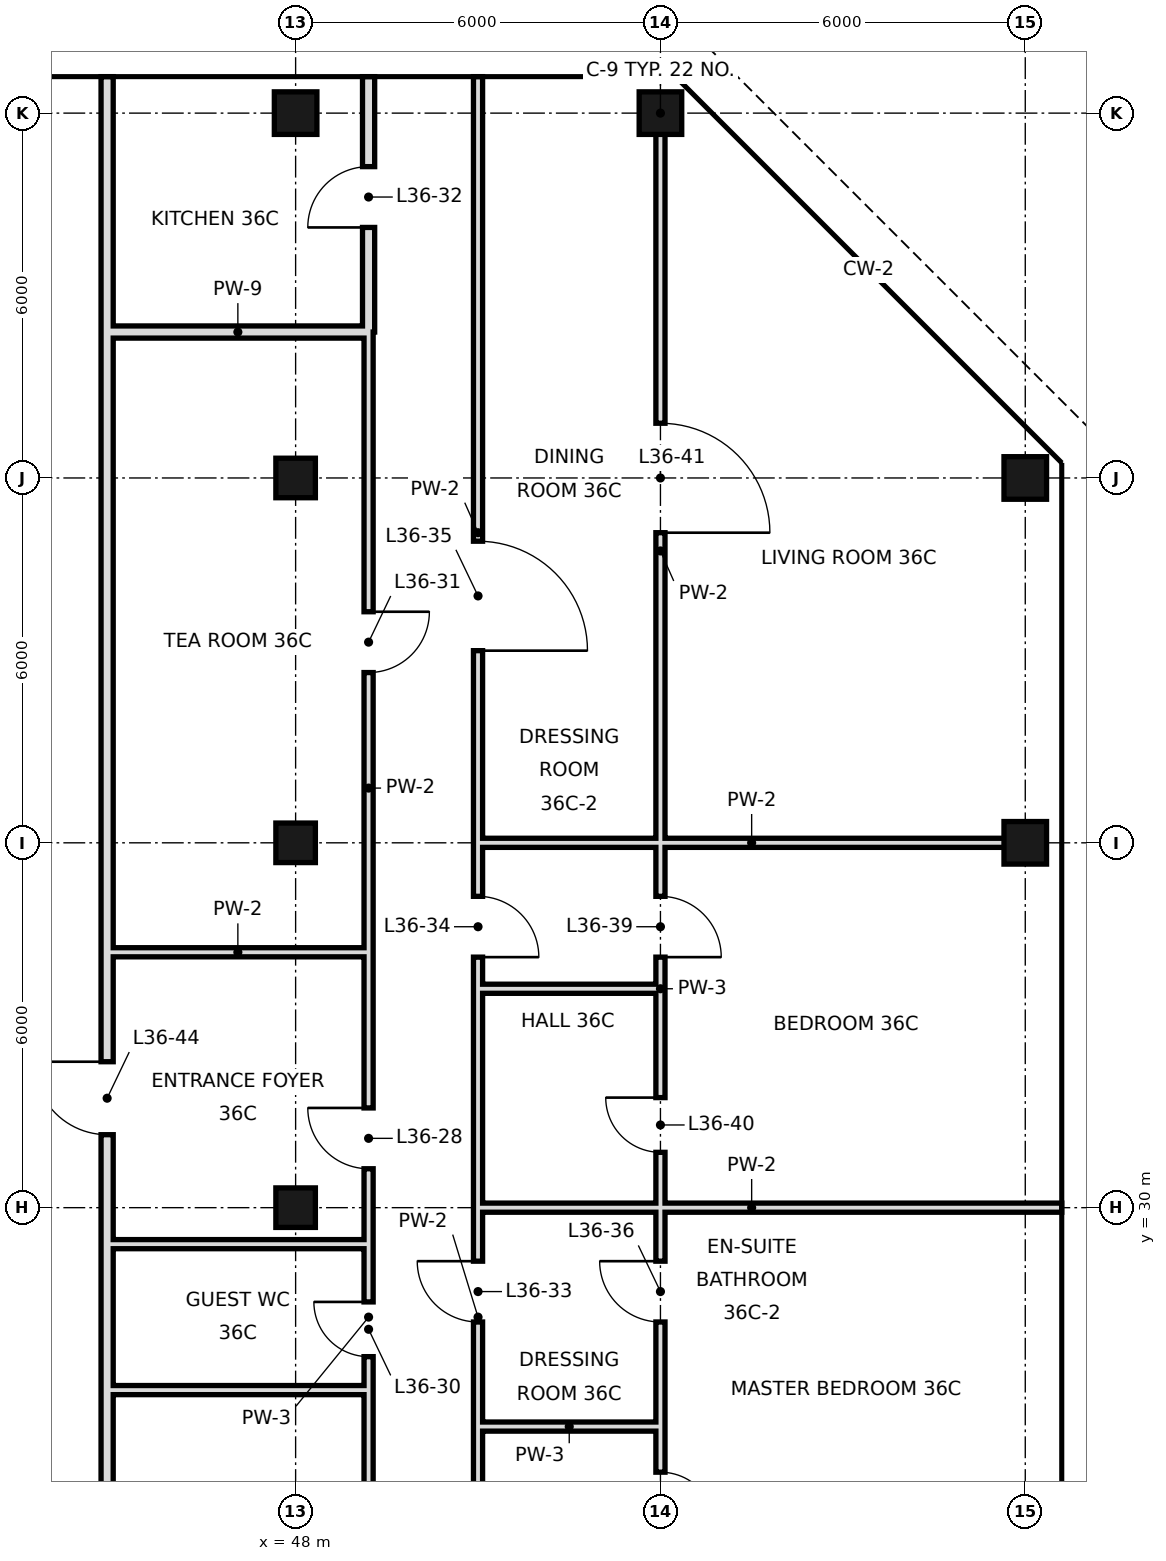
"""IFC4 building model, lengths in metres.
Left out: names, types, materials, properties, quantities, classifications, styles, units other than length and angle.
Written with IfcOpenShell. Run it as: python <this file> out.ifc"""

import sys

from ifc_helpers import new_model, si_unit, direction, frame, frame_2d, origin, origin_2d, place, context, subcontext, project, spatial, rectangle, hollow_rectangle, extrude, element, fill, save


model = new_model("IFC4")
c1 = context("Model", 3, precision=1e-05, world=origin(), true_north=direction((0.0, 1.0)))
c2 = subcontext(c1, "Body", "Model", "MODEL_VIEW")
j1 = project(units=[si_unit("LENGTHUNIT", "METRE"), si_unit("PLANEANGLEUNIT", "RADIAN")], contexts=[c1])
p1 = place(None, origin())
s1 = spatial("IfcSite", under=j1, at=p1, CompositionType="ELEMENT")
p2 = place(p1, origin())
s2 = spatial("IfcBuilding", under=s1, at=p2, CompositionType="ELEMENT")
p3 = place(p2, frame((0.0, 0.0, 158.2)))
s3 = spatial("IfcBuildingStorey", under=s2, at=p3, CompositionType="ELEMENT", Elevation=158.2)
for number, where, z_axis, x_axis in (
    (1, (48.0, 30.0, 0.0), (0.0, 0.0, 1.0), (1.0, 0.0, 0.0)),
    (2, (48.0, 36.0, 0.0), (0.0, 0.0, 1.0), (1.0, 0.0, 0.0)),
    (3, (48.0, 42.0, 0.0), (0.0, 0.0, 1.0), (1.0, 0.0, 0.0)),
):
    element("IfcColumn", number, at=place(p3, frame(where, z_axis=z_axis, x_axis=x_axis)), inside=s3, PredefinedType="COLUMN", context=c2, shape_type="SweptSolid", body=[
        extrude(hollow_rectangle(XDim=0.65, YDim=0.65, WallThickness=0.032, at=origin_2d()), origin(), (0.0, 0.0, 1.0), 3.6),
    ])
for number, where, z_axis, x_axis in (
    (4, (48.0, 48.0, 0.0), (0.0, 0.0, 1.0), (1.0, 0.0, 0.0)),
    (5, (54.0, 48.0, 0.0), (0.0, 0.0, 1.0), (1.0, 0.0, 0.0)),
    (6, (60.0, 36.0, 0.0), (0.0, 0.0, 1.0), (1.0, 0.0, 0.0)),
    (7, (60.0, 42.0, 0.0), (0.0, 0.0, 1.0), (1.0, 0.0, 0.0)),
):
    element("IfcColumn", number, at=place(p3, frame(where, z_axis=z_axis, x_axis=x_axis)), inside=s3, PredefinedType="COLUMN", context=c2, shape_type="SweptSolid", body=[
        extrude(hollow_rectangle(XDim=0.7, YDim=0.7, WallThickness=0.036, at=origin_2d()), origin(), (0.0, 0.0, 1.0), 3.6),
    ])
p4 = place(p3, frame((44.9, 18.7, 0.0), z_axis=(0.0, 0.0, 1.0), x_axis=(0.0, 1.0, 0.0)))
e8 = element("IfcWall", 8, at=p4, inside=s3, PredefinedType="SOLIDWALL", context=c2, shape_type="SweptSolid", body=[
    extrude(rectangle(XDim=25.7, YDim=0.2, at=frame_2d((12.85, 0.0))), origin(), (0.0, 0.0, 1.0), 2.93),
])
p5 = place(p4, frame((12.5, 0.0, 0.0)))
e9 = element("IfcOpeningElement", 9, at=p5, cuts=e8, PredefinedType="OPENING", context=c2, shape_type="SweptSolid", body=[
    extrude(rectangle(XDim=1.2, YDim=2.4, at=frame_2d((0.6, 1.2))), frame((0.0, 0.11, 0.0), z_axis=(0.0, -1.0, 0.0), x_axis=(1.0, 0.0, 0.0)), (0.0, 0.0, 1.0), 0.22),
])
p6 = place(p3, frame((44.9, 44.4, 0.0), z_axis=(0.0, 0.0, 1.0), x_axis=(0.0, 1.0, 0.0)))
e10 = element("IfcWall", 10, at=p6, inside=s3, PredefinedType="SOLIDWALL", context=c2, shape_type="SweptSolid", body=[
    extrude(rectangle(XDim=4.2, YDim=0.2, at=frame_2d((2.1, 0.0))), origin(), (0.0, 0.0, 1.0), 2.68),
])
p7 = place(p3, frame((49.2, 44.4, 0.0), z_axis=(0.0, 0.0, 1.0), x_axis=(0.0, 1.0, 0.0)))
e11 = element("IfcWall", 11, at=p7, inside=s3, PredefinedType="SOLIDWALL", context=c2, shape_type="SweptSolid", body=[
    extrude(rectangle(XDim=4.2, YDim=0.2, at=frame_2d((2.1, 0.0))), origin(), (0.0, 0.0, 1.0), 2.93),
])
p8 = place(p7, frame((1.72, 0.0, 0.0)))
e12 = element("IfcOpeningElement", 12, at=p8, cuts=e11, PredefinedType="OPENING", context=c2, shape_type="SweptSolid", body=[
    extrude(rectangle(XDim=1.0, YDim=2.4, at=frame_2d((0.5, 1.2))), frame((0.0, 0.11, 0.0), z_axis=(0.0, -1.0, 0.0), x_axis=(1.0, 0.0, 0.0)), (0.0, 0.0, 1.0), 0.22),
])
p9 = place(p3, frame((49.2, 10.8, 0.0), z_axis=(0.0, 0.0, 1.0), x_axis=(0.0, 1.0, 0.0)))
e13 = element("IfcWall", 13, at=p9, inside=s3, PredefinedType="PARTITIONING", context=c2, shape_type="SweptSolid", body=[
    extrude(rectangle(XDim=16.2, YDim=0.15, at=frame_2d((8.1, 0.0))), origin(), (0.0, 0.0, 1.0), 3.38),
])
p10 = place(p9, frame((11.2, 0.0, 0.0)))
e14 = element("IfcOpeningElement", 14, at=p10, cuts=e13, PredefinedType="OPENING", context=c2, shape_type="SweptSolid", body=[
    extrude(rectangle(XDim=1.0, YDim=2.4, at=frame_2d((0.5, 1.2))), frame((0.0, 0.085, 0.0), z_axis=(0.0, -1.0, 0.0), x_axis=(1.0, 0.0, 0.0)), (0.0, 0.0, 1.0), 0.17),
])
p11 = place(p3, frame((49.2, 29.4, 0.0), z_axis=(0.0, 0.0, 1.0), x_axis=(0.0, 1.0, 0.0)))
e15 = element("IfcWall", 15, at=p11, inside=s3, PredefinedType="PARTITIONING", context=c2, shape_type="SweptSolid", body=[
    extrude(rectangle(XDim=15.0, YDim=0.15, at=frame_2d((7.5, 0.0))), origin(), (0.0, 0.0, 1.0), 3.38),
])
p12 = place(p11, frame((1.24, 0.0, 0.0)))
e16 = element("IfcOpeningElement", 16, at=p12, cuts=e15, PredefinedType="OPENING", context=c2, shape_type="SweptSolid", body=[
    extrude(rectangle(XDim=1.0, YDim=2.4, at=frame_2d((0.5, 1.2))), frame((0.0, 0.085, 0.0), z_axis=(0.0, -1.0, 0.0), x_axis=(1.0, 0.0, 0.0)), (0.0, 0.0, 1.0), 0.17),
])
p13 = place(p11, frame((9.4, 0.0, 0.0)))
e17 = element("IfcOpeningElement", 17, at=p13, cuts=e15, PredefinedType="OPENING", context=c2, shape_type="SweptSolid", body=[
    extrude(rectangle(XDim=1.0, YDim=2.4, at=frame_2d((0.5, 1.2))), frame((0.0, 0.085, 0.0), z_axis=(0.0, -1.0, 0.0), x_axis=(1.0, 0.0, 0.0)), (0.0, 0.0, 1.0), 0.17),
])
p14 = place(p3, frame((49.2, 27.0, 0.0), z_axis=(0.0, 0.0, 1.0), x_axis=(0.0, 1.0, 0.0)))
e18 = element("IfcWall", 18, at=p14, inside=s3, PredefinedType="PARTITIONING", context=c2, shape_type="SweptSolid", body=[
    extrude(rectangle(XDim=2.4, YDim=0.15, at=frame_2d((1.2, 0.0))), origin(), (0.0, 0.0, 1.0), 3.38),
])
p15 = place(p14, frame((0.55, 0.0, 0.0)))
e19 = element("IfcOpeningElement", 19, at=p15, cuts=e18, PredefinedType="OPENING", context=c2, shape_type="SweptSolid", body=[
    extrude(rectangle(XDim=0.9, YDim=2.4, at=frame_2d((0.45, 1.2))), frame((0.0, 0.085, 0.0), z_axis=(0.0, -1.0, 0.0), x_axis=(1.0, 0.0, 0.0)), (0.0, 0.0, 1.0), 0.17),
])
p16 = place(p3, frame((51.0, 26.4, 0.0), z_axis=(0.0, 0.0, 1.0), x_axis=(0.0, 1.0, 0.0)))
e20 = element("IfcWall", 20, at=p16, inside=s3, PredefinedType="PARTITIONING", context=c2, shape_type="SweptSolid", body=[
    extrude(rectangle(XDim=3.6, YDim=0.15, at=frame_2d((1.8, 0.0))), origin(), (0.0, 0.0, 1.0), 3.38),
])
p17 = place(p16, frame((1.72, 0.0, 0.0)))
e21 = element("IfcOpeningElement", 21, at=p17, cuts=e20, PredefinedType="OPENING", context=c2, shape_type="SweptSolid", body=[
    extrude(rectangle(XDim=1.0, YDim=2.4, at=frame_2d((0.5, 1.2))), frame((0.0, 0.085, 0.0), z_axis=(0.0, -1.0, 0.0), x_axis=(1.0, 0.0, 0.0)), (0.0, 0.0, 1.0), 0.17),
])
p18 = place(p3, frame((51.0, 33.6, 0.0), z_axis=(0.0, 0.0, 1.0), x_axis=(0.0, 1.0, 0.0)))
e22 = element("IfcWall", 22, at=p18, inside=s3, PredefinedType="PARTITIONING", context=c2, shape_type="SweptSolid", body=[
    extrude(rectangle(XDim=15.0, YDim=0.15, at=frame_2d((7.5, 0.0))), origin(), (0.0, 0.0, 1.0), 3.38),
])
p19 = place(p18, frame((0.52, 0.0, 0.0)))
e23 = element("IfcOpeningElement", 23, at=p19, cuts=e22, PredefinedType="OPENING", context=c2, shape_type="SweptSolid", body=[
    extrude(rectangle(XDim=1.0, YDim=2.4, at=frame_2d((0.5, 1.2))), frame((0.0, 0.085, 0.0), z_axis=(0.0, -1.0, 0.0), x_axis=(1.0, 0.0, 0.0)), (0.0, 0.0, 1.0), 0.17),
])
p20 = place(p18, frame((5.56, 0.0, 0.0)))
e24 = element("IfcOpeningElement", 24, at=p20, cuts=e22, PredefinedType="OPENING", context=c2, shape_type="SweptSolid", body=[
    extrude(rectangle(XDim=1.8, YDim=2.4, at=frame_2d((0.9, 1.2))), frame((0.0, 0.085, 0.0), z_axis=(0.0, -1.0, 0.0), x_axis=(1.0, 0.0, 0.0)), (0.0, 0.0, 1.0), 0.17),
])
p21 = place(p3, frame((51.0, 18.0, 0.0), z_axis=(0.0, 0.0, 1.0), x_axis=(0.0, 1.0, 0.0)))
e25 = element("IfcWall", 25, at=p21, inside=s3, PredefinedType="PARTITIONING", context=c2, shape_type="SweptSolid", body=[
    extrude(rectangle(XDim=8.4, YDim=0.15, at=frame_2d((4.2, 0.0))), origin(), (0.0, 0.0, 1.0), 3.38),
])
p22 = place(p3, frame((51.0, 30.0, 0.0), z_axis=(0.0, 0.0, 1.0), x_axis=(0.0, 1.0, 0.0)))
e26 = element("IfcWall", 26, at=p22, inside=s3, PredefinedType="PARTITIONING", context=c2, shape_type="SweptSolid", body=[
    extrude(rectangle(XDim=3.6, YDim=0.15, at=frame_2d((1.8, 0.0))), origin(), (0.0, 0.0, 1.0), 3.38),
])
p23 = place(p3, frame((54.0, 26.4, 0.0), z_axis=(0.0, 0.0, 1.0), x_axis=(0.0, 1.0, 0.0)))
e27 = element("IfcWall", 27, at=p23, inside=s3, PredefinedType="PARTITIONING", context=c2, shape_type="SweptSolid", body=[
    extrude(rectangle(XDim=3.6, YDim=0.15, at=frame_2d((1.8, 0.0))), origin(), (0.0, 0.0, 1.0), 3.38),
])
p24 = place(p23, frame((1.72, 0.0, 0.0)))
e28 = element("IfcOpeningElement", 28, at=p24, cuts=e27, PredefinedType="OPENING", context=c2, shape_type="SweptSolid", body=[
    extrude(rectangle(XDim=1.0, YDim=2.4, at=frame_2d((0.5, 1.2))), frame((0.0, 0.085, 0.0), z_axis=(0.0, -1.0, 0.0), x_axis=(1.0, 0.0, 0.0)), (0.0, 0.0, 1.0), 0.17),
])
p25 = place(p3, frame((54.0, 33.6, 0.0), z_axis=(0.0, 0.0, 1.0), x_axis=(0.0, 1.0, 0.0)))
e29 = element("IfcWall", 29, at=p25, inside=s3, PredefinedType="PARTITIONING", context=c2, shape_type="SweptSolid", body=[
    extrude(rectangle(XDim=14.4, YDim=0.15, at=frame_2d((7.2, 0.0))), origin(), (0.0, 0.0, 1.0), 3.38),
])
p26 = place(p25, frame((0.52, 0.0, 0.0)))
e30 = element("IfcOpeningElement", 30, at=p26, cuts=e29, PredefinedType="OPENING", context=c2, shape_type="SweptSolid", body=[
    extrude(rectangle(XDim=1.0, YDim=2.4, at=frame_2d((0.5, 1.2))), frame((0.0, 0.085, 0.0), z_axis=(0.0, -1.0, 0.0), x_axis=(1.0, 0.0, 0.0)), (0.0, 0.0, 1.0), 0.17),
])
p27 = place(p25, frame((7.5, 0.0, 0.0)))
e31 = element("IfcOpeningElement", 31, at=p27, cuts=e29, PredefinedType="OPENING", context=c2, shape_type="SweptSolid", body=[
    extrude(rectangle(XDim=1.8, YDim=2.4, at=frame_2d((0.9, 1.2))), frame((0.0, 0.085, 0.0), z_axis=(0.0, -1.0, 0.0), x_axis=(1.0, 0.0, 0.0)), (0.0, 0.0, 1.0), 0.17),
])
p28 = place(p3, frame((54.0, 18.0, 0.0), z_axis=(0.0, 0.0, 1.0), x_axis=(0.0, 1.0, 0.0)))
e32 = element("IfcWall", 32, at=p28, inside=s3, PredefinedType="PARTITIONING", context=c2, shape_type="SweptSolid", body=[
    extrude(rectangle(XDim=8.4, YDim=0.15, at=frame_2d((4.2, 0.0))), origin(), (0.0, 0.0, 1.0), 3.38),
])
p29 = place(p28, frame((6.75, 0.0, 0.0)))
e33 = element("IfcOpeningElement", 33, at=p29, cuts=e32, PredefinedType="OPENING", context=c2, shape_type="SweptSolid", body=[
    extrude(rectangle(XDim=0.9, YDim=2.4, at=frame_2d((0.45, 1.2))), frame((0.0, 0.085, 0.0), z_axis=(0.0, -1.0, 0.0), x_axis=(1.0, 0.0, 0.0)), (0.0, 0.0, 1.0), 0.17),
])
p30 = place(p3, frame((54.0, 30.0, 0.0), z_axis=(0.0, 0.0, 1.0), x_axis=(0.0, 1.0, 0.0)))
e34 = element("IfcWall", 34, at=p30, inside=s3, PredefinedType="PARTITIONING", context=c2, shape_type="SweptSolid", body=[
    extrude(rectangle(XDim=3.6, YDim=0.15, at=frame_2d((1.8, 0.0))), origin(), (0.0, 0.0, 1.0), 3.38),
])
p31 = place(p30, frame((0.91, 0.0, 0.0)))
e35 = element("IfcOpeningElement", 35, at=p31, cuts=e34, PredefinedType="OPENING", context=c2, shape_type="SweptSolid", body=[
    extrude(rectangle(XDim=0.9, YDim=2.4, at=frame_2d((0.45, 1.2))), frame((0.0, 0.085, 0.0), z_axis=(0.0, -1.0, 0.0), x_axis=(1.0, 0.0, 0.0)), (0.0, 0.0, 1.0), 0.17),
])
p32 = place(p3, frame((51.0, 26.4, 0.0), z_axis=(0.0, 0.0, 1.0), x_axis=(1.0, 0.0, 0.0)))
e36 = element("IfcWall", 36, at=p32, inside=s3, PredefinedType="PARTITIONING", context=c2, shape_type="SweptSolid", body=[
    extrude(rectangle(XDim=3.0, YDim=0.15, at=frame_2d((1.5, 0.0))), origin(), (0.0, 0.0, 1.0), 3.38),
])
for number, where, z_axis, x_axis in (
    (37, (44.9, 27.0, 0.0), (0.0, 0.0, 1.0), (1.0, 0.0, 0.0)),
    (38, (44.9, 29.4, 0.0), (0.0, 0.0, 1.0), (1.0, 0.0, 0.0)),
):
    element("IfcWall", number, at=place(p3, frame(where, z_axis=z_axis, x_axis=x_axis)), inside=s3, PredefinedType="PARTITIONING", context=c2, shape_type="SweptSolid", body=[
        extrude(rectangle(XDim=4.3, YDim=0.15, at=frame_2d((2.15, 0.0))), origin(), (0.0, 0.0, 1.0), 3.38),
    ])
p33 = place(p3, frame((54.0, 30.0, 0.0), z_axis=(0.0, 0.0, 1.0), x_axis=(1.0, 0.0, 0.0)))
e39 = element("IfcWall", 39, at=p33, inside=s3, PredefinedType="PARTITIONING", context=c2, shape_type="SweptSolid", body=[
    extrude(rectangle(XDim=6.6, YDim=0.15, at=frame_2d((3.3, 0.0))), origin(), (0.0, 0.0, 1.0), 2.68),
])
p34 = place(p3, frame((51.0, 30.0, 0.0), z_axis=(0.0, 0.0, 1.0), x_axis=(1.0, 0.0, 0.0)))
e40 = element("IfcWall", 40, at=p34, inside=s3, PredefinedType="PARTITIONING", context=c2, shape_type="SweptSolid", body=[
    extrude(rectangle(XDim=3.0, YDim=0.15, at=frame_2d((1.5, 0.0))), origin(), (0.0, 0.0, 1.0), 2.68),
])
p35 = place(p3, frame((51.0, 33.6, 0.0), z_axis=(0.0, 0.0, 1.0), x_axis=(1.0, 0.0, 0.0)))
e41 = element("IfcWall", 41, at=p35, inside=s3, PredefinedType="PARTITIONING", context=c2, shape_type="SweptSolid", body=[
    extrude(rectangle(XDim=3.0, YDim=0.15, at=frame_2d((1.5, 0.0))), origin(), (0.0, 0.0, 1.0), 3.38),
])
p36 = place(p3, frame((44.9, 34.2, 0.0), z_axis=(0.0, 0.0, 1.0), x_axis=(1.0, 0.0, 0.0)))
e42 = element("IfcWall", 42, at=p36, inside=s3, PredefinedType="PARTITIONING", context=c2, shape_type="SweptSolid", body=[
    extrude(rectangle(XDim=4.3, YDim=0.15, at=frame_2d((2.15, 0.0))), origin(), (0.0, 0.0, 1.0), 3.38),
])
p37 = place(p3, frame((51.0, 36.0, 0.0), z_axis=(0.0, 0.0, 1.0), x_axis=(1.0, 0.0, 0.0)))
e43 = element("IfcWall", 43, at=p37, inside=s3, PredefinedType="PARTITIONING", context=c2, shape_type="SweptSolid", body=[
    extrude(rectangle(XDim=9.0, YDim=0.15, at=frame_2d((4.5, 0.0))), origin(), (0.0, 0.0, 1.0), 2.68),
])
p38 = place(p3, frame((44.9, 44.4, 0.0), z_axis=(0.0, 0.0, 1.0), x_axis=(1.0, 0.0, 0.0)))
e44 = element("IfcWall", 44, at=p38, inside=s3, PredefinedType="SOLIDWALL", context=c2, shape_type="SweptSolid", body=[
    extrude(rectangle(XDim=4.3, YDim=0.2, at=frame_2d((2.15, 0.0))), origin(), (0.0, 0.0, 1.0), 2.93),
])
p39 = place(p12, frame((1.0, 0.0, 0.0), z_axis=(0.0, 0.0, 1.0), x_axis=(-1.0, 0.0, 0.0)))
e45 = element("IfcDoor", 45, at=p39, inside=s3, OperationType="SINGLE_SWING_LEFT", PredefinedType="DOOR", context=c2, shape_type="SweptSolid", body=[
    extrude(rectangle(XDim=1.0, YDim=2.4, at=frame_2d((0.5, 1.2))), frame((0.0, 0.025, 0.0), z_axis=(0.0, -1.0, 0.0), x_axis=(1.0, 0.0, 0.0)), (0.0, 0.0, 1.0), 0.05),
])
fill(e16, e45)
p40 = place(p15, frame((0.9, 0.0, 0.0), z_axis=(0.0, 0.0, 1.0), x_axis=(-1.0, 0.0, 0.0)))
e46 = element("IfcDoor", 46, at=p40, inside=s3, OperationType="SINGLE_SWING_LEFT", PredefinedType="DOOR", context=c2, shape_type="SweptSolid", body=[
    extrude(rectangle(XDim=0.9, YDim=2.4, at=frame_2d((0.45, 1.2))), frame((0.0, 0.025, 0.0), z_axis=(0.0, -1.0, 0.0), x_axis=(1.0, 0.0, 0.0)), (0.0, 0.0, 1.0), 0.05),
])
fill(e19, e46)
p41 = place(p13, origin())
e47 = element("IfcDoor", 47, at=p41, inside=s3, OperationType="SINGLE_SWING_RIGHT", PredefinedType="DOOR", context=c2, shape_type="SweptSolid", body=[
    extrude(rectangle(XDim=1.0, YDim=2.4, at=frame_2d((0.5, 1.2))), frame((0.0, 0.025, 0.0), z_axis=(0.0, -1.0, 0.0), x_axis=(1.0, 0.0, 0.0)), (0.0, 0.0, 1.0), 0.05),
])
fill(e17, e47)
p42 = place(p8, origin())
e48 = element("IfcDoor", 48, at=p42, inside=s3, OperationType="SINGLE_SWING_LEFT", PredefinedType="DOOR", context=c2, shape_type="SweptSolid", body=[
    extrude(rectangle(XDim=1.0, YDim=2.4, at=frame_2d((0.5, 1.2))), frame((0.0, 0.025, 0.0), z_axis=(0.0, -1.0, 0.0), x_axis=(1.0, 0.0, 0.0)), (0.0, 0.0, 1.0), 0.05),
])
fill(e12, e48)
p43 = place(p17, frame((1.0, 0.0, 0.0), z_axis=(0.0, 0.0, 1.0), x_axis=(-1.0, 0.0, 0.0)))
e49 = element("IfcDoor", 49, at=p43, inside=s3, OperationType="SINGLE_SWING_LEFT", PredefinedType="DOOR", context=c2, shape_type="SweptSolid", body=[
    extrude(rectangle(XDim=1.0, YDim=2.4, at=frame_2d((0.5, 1.2))), frame((0.0, 0.025, 0.0), z_axis=(0.0, -1.0, 0.0), x_axis=(1.0, 0.0, 0.0)), (0.0, 0.0, 1.0), 0.05),
])
fill(e21, e49)
p44 = place(p19, frame((1.0, 0.0, 0.0), z_axis=(0.0, 0.0, 1.0), x_axis=(-1.0, 0.0, 0.0)))
e50 = element("IfcDoor", 50, at=p44, inside=s3, OperationType="SINGLE_SWING_RIGHT", PredefinedType="DOOR", context=c2, shape_type="SweptSolid", body=[
    extrude(rectangle(XDim=1.0, YDim=2.4, at=frame_2d((0.5, 1.2))), frame((0.0, 0.025, 0.0), z_axis=(0.0, -1.0, 0.0), x_axis=(1.0, 0.0, 0.0)), (0.0, 0.0, 1.0), 0.05),
])
fill(e23, e50)
p45 = place(p20, frame((1.8, 0.0, 0.0), z_axis=(0.0, 0.0, 1.0), x_axis=(-1.0, 0.0, 0.0)))
e51 = element("IfcDoor", 51, at=p45, inside=s3, OperationType="SINGLE_SWING_RIGHT", PredefinedType="DOOR", context=c2, shape_type="SweptSolid", body=[
    extrude(rectangle(XDim=1.8, YDim=2.4, at=frame_2d((0.9, 1.2))), frame((0.0, 0.025, 0.0), z_axis=(0.0, -1.0, 0.0), x_axis=(1.0, 0.0, 0.0)), (0.0, 0.0, 1.0), 0.05),
])
fill(e24, e51)
p46 = place(p24, frame((1.0, 0.0, 0.0), z_axis=(0.0, 0.0, 1.0), x_axis=(-1.0, 0.0, 0.0)))
e52 = element("IfcDoor", 52, at=p46, inside=s3, OperationType="SINGLE_SWING_LEFT", PredefinedType="DOOR", context=c2, shape_type="SweptSolid", body=[
    extrude(rectangle(XDim=1.0, YDim=2.4, at=frame_2d((0.5, 1.2))), frame((0.0, 0.025, 0.0), z_axis=(0.0, -1.0, 0.0), x_axis=(1.0, 0.0, 0.0)), (0.0, 0.0, 1.0), 0.05),
])
fill(e28, e52)
p47 = place(p29, frame((0.9, 0.0, 0.0), z_axis=(0.0, 0.0, 1.0), x_axis=(-1.0, 0.0, 0.0)))
e53 = element("IfcDoor", 53, at=p47, inside=s3, OperationType="SINGLE_SWING_RIGHT", PredefinedType="DOOR", context=c2, shape_type="SweptSolid", body=[
    extrude(rectangle(XDim=0.9, YDim=2.4, at=frame_2d((0.45, 1.2))), frame((0.0, 0.025, 0.0), z_axis=(0.0, -1.0, 0.0), x_axis=(1.0, 0.0, 0.0)), (0.0, 0.0, 1.0), 0.05),
])
fill(e33, e53)
p48 = place(p26, frame((1.0, 0.0, 0.0), z_axis=(0.0, 0.0, 1.0), x_axis=(-1.0, 0.0, 0.0)))
e54 = element("IfcDoor", 54, at=p48, inside=s3, OperationType="SINGLE_SWING_RIGHT", PredefinedType="DOOR", context=c2, shape_type="SweptSolid", body=[
    extrude(rectangle(XDim=1.0, YDim=2.4, at=frame_2d((0.5, 1.2))), frame((0.0, 0.025, 0.0), z_axis=(0.0, -1.0, 0.0), x_axis=(1.0, 0.0, 0.0)), (0.0, 0.0, 1.0), 0.05),
])
fill(e30, e54)
p49 = place(p31, frame((0.9, 0.0, 0.0), z_axis=(0.0, 0.0, 1.0), x_axis=(-1.0, 0.0, 0.0)))
e55 = element("IfcDoor", 55, at=p49, inside=s3, OperationType="SINGLE_SWING_LEFT", PredefinedType="DOOR", context=c2, shape_type="SweptSolid", body=[
    extrude(rectangle(XDim=0.9, YDim=2.4, at=frame_2d((0.45, 1.2))), frame((0.0, 0.025, 0.0), z_axis=(0.0, -1.0, 0.0), x_axis=(1.0, 0.0, 0.0)), (0.0, 0.0, 1.0), 0.05),
])
fill(e35, e55)
p50 = place(p27, frame((1.8, 0.0, 0.0), z_axis=(0.0, 0.0, 1.0), x_axis=(-1.0, 0.0, 0.0)))
e56 = element("IfcDoor", 56, at=p50, inside=s3, OperationType="SINGLE_SWING_RIGHT", PredefinedType="DOOR", context=c2, shape_type="SweptSolid", body=[
    extrude(rectangle(XDim=1.8, YDim=2.4, at=frame_2d((0.9, 1.2))), frame((0.0, 0.025, 0.0), z_axis=(0.0, -1.0, 0.0), x_axis=(1.0, 0.0, 0.0)), (0.0, 0.0, 1.0), 0.05),
])
fill(e31, e56)
p51 = place(p5, frame((1.2, 0.0, 0.0), z_axis=(0.0, 0.0, 1.0), x_axis=(-1.0, 0.0, 0.0)))
e57 = element("IfcDoor", 57, at=p51, inside=s3, OperationType="SINGLE_SWING_LEFT", PredefinedType="DOOR", context=c2, shape_type="SweptSolid", body=[
    extrude(rectangle(XDim=1.2, YDim=2.4, at=frame_2d((0.6, 1.2))), frame((0.0, 0.025, 0.0), z_axis=(0.0, -1.0, 0.0), x_axis=(1.0, 0.0, 0.0)), (0.0, 0.0, 1.0), 0.05),
])
fill(e9, e57)
save(model, sys.argv[1])
